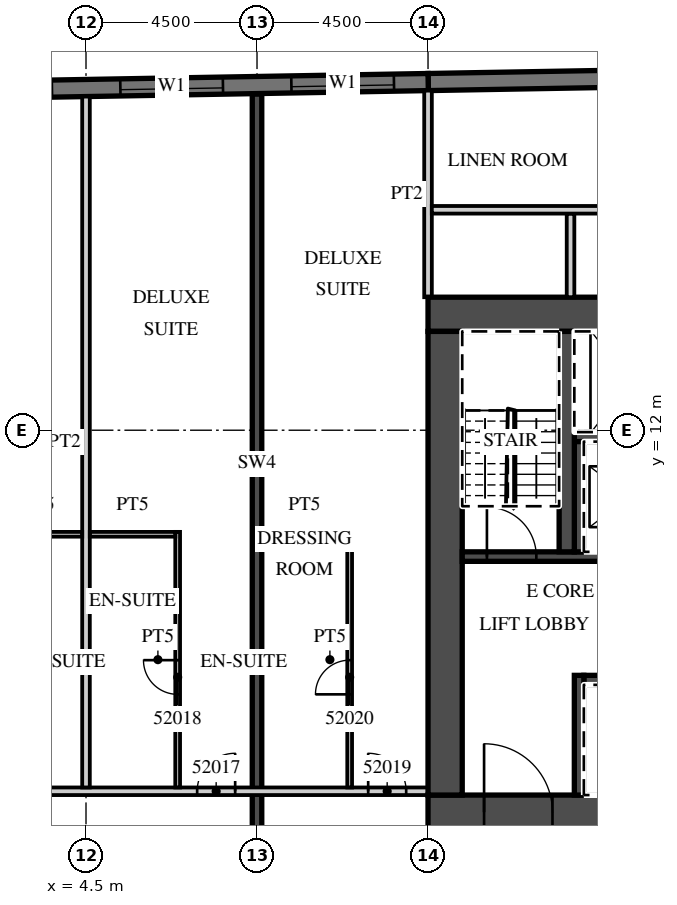
"""IFC4 building model, lengths in metres.
Left out: names, types, materials, properties, quantities, classifications, styles, units other than length and angle.
Written with IfcOpenShell. Run it as: python <this file> out.ifc"""

import sys

from ifc_helpers import new_model, si_unit, direction, frame, frame_2d, origin, place, context, subcontext, project, spatial, rectangle, extrude, element, fill, save


model = new_model("IFC4")
c1 = context("Model", 3, precision=1e-05, world=origin(), true_north=direction((0.0, 1.0)))
c2 = subcontext(c1, "Body", "Model", "MODEL_VIEW")
j1 = project(units=[si_unit("LENGTHUNIT", "METRE"), si_unit("PLANEANGLEUNIT", "RADIAN")], contexts=[c1])
p1 = place(None, origin())
s1 = spatial("IfcSite", under=j1, at=p1, CompositionType="ELEMENT")
p2 = place(p1, origin())
s2 = spatial("IfcBuilding", under=s1, at=p2, CompositionType="ELEMENT")
p3 = place(p2, frame((0.0, 0.0, 217.7)))
s3 = spatial("IfcBuildingStorey", under=s2, at=p3, CompositionType="ELEMENT", Elevation=217.7)
p4 = place(p3, frame((9.0, 1.4, 0.0), z_axis=(0.0, 0.0, 1.0), x_axis=(0.0, 1.0, 0.0)))
e1 = element("IfcWall", 1, at=p4, inside=s3, PredefinedType="SHEAR", context=c2, shape_type="SweptSolid", body=[
    extrude(rectangle(XDim=19.446, YDim=0.25, at=frame_2d((9.723, 0.0))), origin(), (0.0, 0.0, 1.0), 3.3),
])
p5 = place(p3, frame((31.504, 21.476, 0.0), z_axis=(0.0, 0.0, 1.0), x_axis=(-0.999847677887, -0.017453395744, 0.0)))
e2 = element("IfcWall", 2, at=p5, inside=s3, PredefinedType="SOLIDWALL", context=c2, shape_type="SweptSolid", body=[
    extrude(rectangle(XDim=18.003, YDim=0.45, at=frame_2d((9.001, 0.0))), origin(), (0.0, 0.0, 1.0), 3.02),
])
p6 = place(p3, frame((13.504, 21.161, 0.0), z_axis=(0.0, 0.0, 1.0), x_axis=(-0.999847763257, -0.017448504532, 0.0)))
e3 = element("IfcWall", 3, at=p6, inside=s3, PredefinedType="SOLIDWALL", context=c2, shape_type="SweptSolid", body=[
    extrude(rectangle(XDim=46.859, YDim=0.45, at=frame_2d((23.43, 0.0))), origin(), (0.0, 0.0, 1.0), 3.02),
])
p7 = place(p6, frame((0.9, 0.0, 0.45)))
e4 = element("IfcOpeningElement", 4, at=p7, cuts=e3, PredefinedType="OPENING", context=c2, shape_type="SweptSolid", body=[
    extrude(rectangle(XDim=2.7, YDim=2.25, at=frame_2d((1.35, 1.125))), frame((0.0, 0.235, 0.0), z_axis=(0.0, -1.0, 0.0), x_axis=(1.0, 0.0, 0.0)), (0.0, 0.0, 1.0), 0.47),
])
p8 = place(p6, frame((5.401, 0.0, 0.45)))
e5 = element("IfcOpeningElement", 5, at=p8, cuts=e3, PredefinedType="OPENING", context=c2, shape_type="SweptSolid", body=[
    extrude(rectangle(XDim=2.7, YDim=2.25, at=frame_2d((1.35, 1.125))), frame((0.0, 0.235, 0.0), z_axis=(0.0, -1.0, 0.0), x_axis=(1.0, 0.0, 0.0)), (0.0, 0.0, 1.0), 0.47),
])
p9 = place(p6, frame((9.902, 0.0, 0.45)))
e6 = element("IfcOpeningElement", 6, at=p9, cuts=e3, PredefinedType="OPENING", context=c2, shape_type="SweptSolid", body=[
    extrude(rectangle(XDim=2.7, YDim=2.25, at=frame_2d((1.35, 1.125))), frame((0.0, 0.235, 0.0), z_axis=(0.0, -1.0, 0.0), x_axis=(1.0, 0.0, 0.0)), (0.0, 0.0, 1.0), 0.47),
])
p10 = place(p6, frame((14.402, 0.0, 0.45)))
e7 = element("IfcOpeningElement", 7, at=p10, cuts=e3, PredefinedType="OPENING", context=c2, shape_type="SweptSolid", body=[
    extrude(rectangle(XDim=2.7, YDim=2.25, at=frame_2d((1.35, 1.125))), frame((0.0, 0.235, 0.0), z_axis=(0.0, -1.0, 0.0), x_axis=(1.0, 0.0, 0.0)), (0.0, 0.0, 1.0), 0.47),
])
p11 = place(p6, frame((18.903, 0.0, 0.45)))
e8 = element("IfcOpeningElement", 8, at=p11, cuts=e3, PredefinedType="OPENING", context=c2, shape_type="SweptSolid", body=[
    extrude(rectangle(XDim=2.7, YDim=2.25, at=frame_2d((1.35, 1.125))), frame((0.0, 0.235, 0.0), z_axis=(0.0, -1.0, 0.0), x_axis=(1.0, 0.0, 0.0)), (0.0, 0.0, 1.0), 0.47),
])
p12 = place(p6, frame((23.404, 0.0, 0.45)))
e9 = element("IfcOpeningElement", 9, at=p12, cuts=e3, PredefinedType="OPENING", context=c2, shape_type="SweptSolid", body=[
    extrude(rectangle(XDim=2.7, YDim=2.25, at=frame_2d((1.35, 1.125))), frame((0.0, 0.235, 0.0), z_axis=(0.0, -1.0, 0.0), x_axis=(1.0, 0.0, 0.0)), (0.0, 0.0, 1.0), 0.47),
])
p13 = place(p6, frame((27.904, 0.0, 0.45)))
e10 = element("IfcOpeningElement", 10, at=p13, cuts=e3, PredefinedType="OPENING", context=c2, shape_type="SweptSolid", body=[
    extrude(rectangle(XDim=2.7, YDim=2.25, at=frame_2d((1.35, 1.125))), frame((0.0, 0.235, 0.0), z_axis=(0.0, -1.0, 0.0), x_axis=(1.0, 0.0, 0.0)), (0.0, 0.0, 1.0), 0.47),
])
p14 = place(p6, frame((32.405, 0.0, 0.45)))
e11 = element("IfcOpeningElement", 11, at=p14, cuts=e3, PredefinedType="OPENING", context=c2, shape_type="SweptSolid", body=[
    extrude(rectangle(XDim=2.7, YDim=2.25, at=frame_2d((1.35, 1.125))), frame((0.0, 0.235, 0.0), z_axis=(0.0, -1.0, 0.0), x_axis=(1.0, 0.0, 0.0)), (0.0, 0.0, 1.0), 0.47),
])
p15 = place(p6, frame((36.906, 0.0, 0.45)))
e12 = element("IfcOpeningElement", 12, at=p15, cuts=e3, PredefinedType="OPENING", context=c2, shape_type="SweptSolid", body=[
    extrude(rectangle(XDim=2.7, YDim=2.25, at=frame_2d((1.35, 1.125))), frame((0.0, 0.235, 0.0), z_axis=(0.0, -1.0, 0.0), x_axis=(1.0, 0.0, 0.0)), (0.0, 0.0, 1.0), 0.47),
])
p16 = place(p6, frame((41.406, 0.0, 0.45)))
e13 = element("IfcOpeningElement", 13, at=p16, cuts=e3, PredefinedType="OPENING", context=c2, shape_type="SweptSolid", body=[
    extrude(rectangle(XDim=2.7, YDim=2.25, at=frame_2d((1.35, 1.125))), frame((0.0, 0.235, 0.0), z_axis=(0.0, -1.0, 0.0), x_axis=(1.0, 0.0, 0.0)), (0.0, 0.0, 1.0), 0.47),
])
p17 = place(p3, frame((13.5, 15.5, 0.0), z_axis=(0.0, 0.0, 1.0), x_axis=(0.0, 1.0, 0.0)))
e14 = element("IfcWall", 14, at=p17, inside=s3, PredefinedType="PARTITIONING", context=c2, shape_type="SweptSolid", body=[
    extrude(rectangle(XDim=5.436, YDim=0.2, at=frame_2d((2.718, 0.0))), origin(), (0.0, 0.0, 1.0), 3.02),
])
p18 = place(p3, frame((-13.5, 2.5, 0.0), z_axis=(0.0, 0.0, 1.0), x_axis=(1.0, 0.0, 0.0)))
e15 = element("IfcWall", 15, at=p18, inside=s3, PredefinedType="PARTITIONING", context=c2, shape_type="SweptSolid", body=[
    extrude(rectangle(XDim=27.0, YDim=0.2, at=frame_2d((13.5, 0.0))), origin(), (0.0, 0.0, 1.0), 3.02),
])
p19 = place(p18, frame((2.925, 0.0, 0.0)))
e16 = element("IfcOpeningElement", 16, at=p19, cuts=e15, PredefinedType="OPENING", context=c2, shape_type="SweptSolid", body=[
    extrude(rectangle(XDim=1.0, YDim=2.1, at=frame_2d((0.5, 1.05))), frame((0.0, 0.11, 0.0), z_axis=(0.0, -1.0, 0.0), x_axis=(1.0, 0.0, 0.0)), (0.0, 0.0, 1.0), 0.22),
])
p20 = place(p18, frame((7.45, 0.0, 0.0)))
e17 = element("IfcOpeningElement", 17, at=p20, cuts=e15, PredefinedType="OPENING", context=c2, shape_type="SweptSolid", body=[
    extrude(rectangle(XDim=1.0, YDim=2.1, at=frame_2d((0.5, 1.05))), frame((0.0, 0.11, 0.0), z_axis=(0.0, -1.0, 0.0), x_axis=(1.0, 0.0, 0.0)), (0.0, 0.0, 1.0), 0.22),
])
p21 = place(p18, frame((11.925, 0.0, 0.0)))
e18 = element("IfcOpeningElement", 18, at=p21, cuts=e15, PredefinedType="OPENING", context=c2, shape_type="SweptSolid", body=[
    extrude(rectangle(XDim=1.0, YDim=2.1, at=frame_2d((0.5, 1.05))), frame((0.0, 0.11, 0.0), z_axis=(0.0, -1.0, 0.0), x_axis=(1.0, 0.0, 0.0)), (0.0, 0.0, 1.0), 0.22),
])
p22 = place(p18, frame((14.075, 0.0, 0.0)))
e19 = element("IfcOpeningElement", 19, at=p22, cuts=e15, PredefinedType="OPENING", context=c2, shape_type="SweptSolid", body=[
    extrude(rectangle(XDim=1.0, YDim=2.1, at=frame_2d((0.5, 1.05))), frame((0.0, 0.11, 0.0), z_axis=(0.0, -1.0, 0.0), x_axis=(1.0, 0.0, 0.0)), (0.0, 0.0, 1.0), 0.22),
])
p23 = place(p18, frame((20.925, 0.0, 0.0)))
e20 = element("IfcOpeningElement", 20, at=p23, cuts=e15, PredefinedType="OPENING", context=c2, shape_type="SweptSolid", body=[
    extrude(rectangle(XDim=1.0, YDim=2.1, at=frame_2d((0.5, 1.05))), frame((0.0, 0.11, 0.0), z_axis=(0.0, -1.0, 0.0), x_axis=(1.0, 0.0, 0.0)), (0.0, 0.0, 1.0), 0.22),
])
p24 = place(p18, frame((25.425, 0.0, 0.0)))
e21 = element("IfcOpeningElement", 21, at=p24, cuts=e15, PredefinedType="OPENING", context=c2, shape_type="SweptSolid", body=[
    extrude(rectangle(XDim=1.0, YDim=2.1, at=frame_2d((0.5, 1.05))), frame((0.0, 0.11, 0.0), z_axis=(0.0, -1.0, 0.0), x_axis=(1.0, 0.0, 0.0)), (0.0, 0.0, 1.0), 0.22),
])
p25 = place(p3, frame((4.5, 2.6, 0.0), z_axis=(0.0, 0.0, 1.0), x_axis=(0.0, 1.0, 0.0)))
e22 = element("IfcWall", 22, at=p25, inside=s3, PredefinedType="PARTITIONING", context=c2, shape_type="SweptSolid", body=[
    extrude(rectangle(XDim=18.179, YDim=0.2, at=frame_2d((9.089, 0.0))), origin(), (0.0, 0.0, 1.0), 3.02),
])
p26 = place(p3, frame((2.15, 9.262, 0.0), z_axis=(0.0, 0.0, 1.0), x_axis=(1.0, 0.0, 0.0)))
e23 = element("IfcWall", 23, at=p26, inside=s3, PredefinedType="PARTITIONING", context=c2, shape_type="SweptSolid", body=[
    extrude(rectangle(XDim=2.25, YDim=0.125, at=frame_2d((1.125, 0.0))), origin(), (0.0, 0.0, 1.0), 3.02),
])
p27 = place(p3, frame((6.912, 2.6, 0.0), z_axis=(0.0, 0.0, 1.0), x_axis=(0.0, 1.0, 0.0)))
e24 = element("IfcWall", 24, at=p27, inside=s3, PredefinedType="PARTITIONING", context=c2, shape_type="SweptSolid", body=[
    extrude(rectangle(XDim=6.725, YDim=0.125, at=frame_2d((3.362, 0.0))), origin(), (0.0, 0.0, 1.0), 3.02),
])
p28 = place(p27, frame((2.45, 0.0, 0.0)))
e25 = element("IfcOpeningElement", 25, at=p28, cuts=e24, PredefinedType="OPENING", context=c2, shape_type="SweptSolid", body=[
    extrude(rectangle(XDim=0.9, YDim=2.1, at=frame_2d((0.45, 1.05))), frame((0.0, 0.073, 0.0), z_axis=(0.0, -1.0, 0.0), x_axis=(1.0, 0.0, 0.0)), (0.0, 0.0, 1.0), 0.145),
])
p29 = place(p3, frame((4.6, 9.262, 0.0), z_axis=(0.0, 0.0, 1.0), x_axis=(1.0, 0.0, 0.0)))
e26 = element("IfcWall", 26, at=p29, inside=s3, PredefinedType="PARTITIONING", context=c2, shape_type="SweptSolid", body=[
    extrude(rectangle(XDim=2.25, YDim=0.125, at=frame_2d((1.125, 0.0))), origin(), (0.0, 0.0, 1.0), 3.02),
])
p30 = place(p3, frame((11.438, 2.6, 0.0), z_axis=(0.0, 0.0, 1.0), x_axis=(0.0, 1.0, 0.0)))
e27 = element("IfcWall", 27, at=p30, inside=s3, PredefinedType="PARTITIONING", context=c2, shape_type="SweptSolid", body=[
    extrude(rectangle(XDim=6.725, YDim=0.125, at=frame_2d((3.362, 0.0))), origin(), (0.0, 0.0, 1.0), 3.02),
])
p31 = place(p30, frame((2.45, 0.0, 0.0)))
e28 = element("IfcOpeningElement", 28, at=p31, cuts=e27, PredefinedType="OPENING", context=c2, shape_type="SweptSolid", body=[
    extrude(rectangle(XDim=0.9, YDim=2.1, at=frame_2d((0.45, 1.05))), frame((0.0, 0.073, 0.0), z_axis=(0.0, -1.0, 0.0), x_axis=(1.0, 0.0, 0.0)), (0.0, 0.0, 1.0), 0.145),
])
p32 = place(p3, frame((9.125, 9.262, 0.0), z_axis=(0.0, 0.0, 1.0), x_axis=(1.0, 0.0, 0.0)))
e29 = element("IfcWall", 29, at=p32, inside=s3, PredefinedType="PARTITIONING", context=c2, shape_type="SweptSolid", body=[
    extrude(rectangle(XDim=2.25, YDim=0.125, at=frame_2d((1.125, 0.0))), origin(), (0.0, 0.0, 1.0), 3.02),
])
p33 = place(p3, frame((13.5, 1.95, 0.0), z_axis=(0.0, 0.0, 1.0), x_axis=(1.0, 0.0, 0.0)))
e30 = element("IfcWall", 30, at=p33, inside=s3, PredefinedType="SHEAR", context=c2, shape_type="SweptSolid", body=[
    extrude(rectangle(XDim=18.0, YDim=0.9, at=frame_2d((9.0, 0.0))), origin(), (0.0, 0.0, 1.0), 3.02),
])
p34 = place(p33, frame((1.475, 0.0, 0.0)))
e31 = element("IfcOpeningElement", 31, at=p34, cuts=e30, PredefinedType="OPENING", context=c2, shape_type="SweptSolid", body=[
    extrude(rectangle(XDim=1.8, YDim=2.1, at=frame_2d((0.9, 1.05))), frame((0.0, 0.46, 0.0), z_axis=(0.0, -1.0, 0.0), x_axis=(1.0, 0.0, 0.0)), (0.0, 0.0, 1.0), 0.92),
])
p35 = place(p3, frame((13.5, 15.05, 0.0), z_axis=(0.0, 0.0, 1.0), x_axis=(1.0, 0.0, 0.0)))
e32 = element("IfcWall", 32, at=p35, inside=s3, PredefinedType="SHEAR", context=c2, shape_type="SweptSolid", body=[
    extrude(rectangle(XDim=6.8, YDim=0.9, at=frame_2d((3.4, 0.0))), origin(), (0.0, 0.0, 1.0), 3.02),
])
p36 = place(p35, frame((4.725, 0.0, 0.0)))
e33 = element("IfcOpeningElement", 33, at=p36, cuts=e32, PredefinedType="OPENING", context=c2, shape_type="SweptSolid", body=[
    extrude(rectangle(XDim=1.2, YDim=2.1, at=frame_2d((0.6, 1.05))), frame((0.0, 0.46, 0.0), z_axis=(0.0, -1.0, 0.0), x_axis=(1.0, 0.0, 0.0)), (0.0, 0.0, 1.0), 0.92),
])
p37 = place(p3, frame((13.95, 2.4, 0.0), z_axis=(0.0, 0.0, 1.0), x_axis=(0.0, 1.0, 0.0)))
e34 = element("IfcWall", 34, at=p37, inside=s3, PredefinedType="SHEAR", context=c2, shape_type="SweptSolid", body=[
    extrude(rectangle(XDim=12.2, YDim=0.9, at=frame_2d((6.1, 0.0))), origin(), (0.0, 0.0, 1.0), 3.02),
])
p38 = place(p3, frame((17.6, 5.425, 0.0), z_axis=(0.0, 0.0, 1.0), x_axis=(1.0, 0.0, 0.0)))
e35 = element("IfcWall", 35, at=p38, inside=s3, PredefinedType="SHEAR", context=c2, shape_type="SweptSolid", body=[
    extrude(rectangle(XDim=13.0, YDim=0.25, at=frame_2d((6.5, 0.0))), origin(), (0.0, 0.0, 1.0), 3.02),
])
p39 = place(p38, frame((8.475, 0.0, 0.0)))
e36 = element("IfcOpeningElement", 36, at=p39, cuts=e35, PredefinedType="OPENING", context=c2, shape_type="SweptSolid", body=[
    extrude(rectangle(XDim=1.2, YDim=2.1, at=frame_2d((0.6, 1.05))), frame((0.0, 0.135, 0.0), z_axis=(0.0, -1.0, 0.0), x_axis=(1.0, 0.0, 0.0)), (0.0, 0.0, 1.0), 0.27),
])
p40 = place(p38, frame((5.875, 0.0, 0.0)))
e37 = element("IfcOpeningElement", 37, at=p40, cuts=e35, PredefinedType="OPENING", context=c2, shape_type="SweptSolid", body=[
    extrude(rectangle(XDim=1.2, YDim=2.1, at=frame_2d((0.6, 1.05))), frame((0.0, 0.135, 0.0), z_axis=(0.0, -1.0, 0.0), x_axis=(1.0, 0.0, 0.0)), (0.0, 0.0, 1.0), 0.27),
])
p41 = place(p3, frame((17.475, 2.4, 0.0), z_axis=(0.0, 0.0, 1.0), x_axis=(0.0, 1.0, 0.0)))
e38 = element("IfcWall", 38, at=p41, inside=s3, PredefinedType="SHEAR", context=c2, shape_type="SweptSolid", body=[
    extrude(rectangle(XDim=3.15, YDim=0.25, at=frame_2d((1.575, 0.0))), origin(), (0.0, 0.0, 1.0), 3.02),
])
p42 = place(p3, frame((14.4, 8.675, 0.0), z_axis=(0.0, 0.0, 1.0), x_axis=(1.0, 0.0, 0.0)))
e39 = element("IfcWall", 39, at=p42, inside=s3, PredefinedType="SHEAR", context=c2, shape_type="SweptSolid", body=[
    extrude(rectangle(XDim=16.2, YDim=0.25, at=frame_2d((8.1, 0.0))), origin(), (0.0, 0.0, 1.0), 3.02),
])
p43 = place(p42, frame((6.45, 0.0, 0.0)))
e40 = element("IfcOpeningElement", 40, at=p43, cuts=e39, PredefinedType="OPENING", context=c2, shape_type="SweptSolid", body=[
    extrude(rectangle(XDim=1.2, YDim=2.1, at=frame_2d((0.6, 1.05))), frame((0.0, 0.135, 0.0), z_axis=(0.0, -1.0, 0.0), x_axis=(1.0, 0.0, 0.0)), (0.0, 0.0, 1.0), 0.27),
])
p44 = place(p42, frame((3.8, 0.0, 0.0)))
e41 = element("IfcOpeningElement", 41, at=p44, cuts=e39, PredefinedType="OPENING", context=c2, shape_type="SweptSolid", body=[
    extrude(rectangle(XDim=1.2, YDim=2.1, at=frame_2d((0.6, 1.05))), frame((0.0, 0.135, 0.0), z_axis=(0.0, -1.0, 0.0), x_axis=(1.0, 0.0, 0.0)), (0.0, 0.0, 1.0), 0.27),
])
p45 = place(p42, frame((0.65, 0.0, 0.0)))
e42 = element("IfcOpeningElement", 42, at=p45, cuts=e39, PredefinedType="OPENING", context=c2, shape_type="SweptSolid", body=[
    extrude(rectangle(XDim=1.3, YDim=2.1, at=frame_2d((0.65, 1.05))), frame((0.0, 0.135, 0.0), z_axis=(0.0, -1.0, 0.0), x_axis=(1.0, 0.0, 0.0)), (0.0, 0.0, 1.0), 0.27),
])
p46 = place(p42, frame((13.913, 0.0, 0.0)))
e43 = element("IfcOpeningElement", 43, at=p46, cuts=e39, PredefinedType="OPENING", context=c2, shape_type="SweptSolid", body=[
    extrude(rectangle(XDim=1.0, YDim=2.1, at=frame_2d((0.5, 1.05))), frame((0.0, 0.135, 0.0), z_axis=(0.0, -1.0, 0.0), x_axis=(1.0, 0.0, 0.0)), (0.0, 0.0, 1.0), 0.27),
])
p47 = place(p42, frame((9.938, 0.0, 0.0)))
e44 = element("IfcOpeningElement", 44, at=p47, cuts=e39, PredefinedType="OPENING", context=c2, shape_type="SweptSolid", body=[
    extrude(rectangle(XDim=1.0, YDim=2.1, at=frame_2d((0.5, 1.05))), frame((0.0, 0.135, 0.0), z_axis=(0.0, -1.0, 0.0), x_axis=(1.0, 0.0, 0.0)), (0.0, 0.0, 1.0), 0.27),
])
p48 = place(p3, frame((17.35, 11.825, 0.0), z_axis=(0.0, 0.0, 1.0), x_axis=(1.0, 0.0, 0.0)))
e45 = element("IfcWall", 45, at=p48, inside=s3, PredefinedType="SHEAR", context=c2, shape_type="SweptSolid", body=[
    extrude(rectangle(XDim=13.25, YDim=0.25, at=frame_2d((6.625, 0.0))), origin(), (0.0, 0.0, 1.0), 3.02),
])
p49 = place(p3, frame((17.475, 8.8, 0.0), z_axis=(0.0, 0.0, 1.0), x_axis=(0.0, 1.0, 0.0)))
e46 = element("IfcWall", 46, at=p49, inside=s3, PredefinedType="SHEAR", context=c2, shape_type="SweptSolid", body=[
    extrude(rectangle(XDim=2.9, YDim=0.25, at=frame_2d((1.45, 0.0))), origin(), (0.0, 0.0, 1.0), 3.02),
])
p50 = place(p3, frame((17.15, 8.8, 0.0), z_axis=(0.0, 0.0, 1.0), x_axis=(0.0, 1.0, 0.0)))
e47 = element("IfcWall", 47, at=p50, inside=s3, PredefinedType="SHEAR", context=c2, shape_type="SweptSolid", body=[
    extrude(rectangle(XDim=5.8, YDim=0.4, at=frame_2d((2.9, 0.0))), origin(), (0.0, 0.0, 1.0), 3.02),
])
p51 = place(p3, frame((17.25, 15.5, 0.0), z_axis=(0.0, 0.0, 1.0), x_axis=(0.0, 1.0, 0.0)))
e48 = element("IfcWall", 48, at=p51, inside=s3, PredefinedType="PARTITIONING", context=c2, shape_type="SweptSolid", body=[
    extrude(rectangle(XDim=2.2, YDim=0.2, at=frame_2d((1.1, 0.0))), origin(), (0.0, 0.0, 1.0), 3.02),
])
p52 = place(p3, frame((13.6, 17.8, 0.0), z_axis=(0.0, 0.0, 1.0), x_axis=(1.0, 0.0, 0.0)))
e49 = element("IfcWall", 49, at=p52, inside=s3, PredefinedType="PARTITIONING", context=c2, shape_type="SweptSolid", body=[
    extrude(rectangle(XDim=28.657, YDim=0.2, at=frame_2d((14.329, 0.0))), origin(), (0.0, 0.0, 1.0), 3.02),
])
p53 = place(p52, frame((16.613, 0.0, 0.0)))
e50 = element("IfcOpeningElement", 50, at=p53, cuts=e49, PredefinedType="OPENING", context=c2, shape_type="SweptSolid", body=[
    extrude(rectangle(XDim=0.9, YDim=2.1, at=frame_2d((0.45, 1.05))), frame((0.0, 0.11, 0.0), z_axis=(0.0, -1.0, 0.0), x_axis=(1.0, 0.0, 0.0)), (0.0, 0.0, 1.0), 0.22),
])
p54 = place(p52, frame((8.312, 0.0, 0.0)))
e51 = element("IfcOpeningElement", 51, at=p54, cuts=e49, PredefinedType="OPENING", context=c2, shape_type="SweptSolid", body=[
    extrude(rectangle(XDim=0.9, YDim=2.1, at=frame_2d((0.45, 1.05))), frame((0.0, 0.11, 0.0), z_axis=(0.0, -1.0, 0.0), x_axis=(1.0, 0.0, 0.0)), (0.0, 0.0, 1.0), 0.22),
])
p55 = place(p7, origin())
e52 = element("IfcWindow", 52, at=p55, inside=s3, PartitioningType="SINGLE_PANEL", PredefinedType="WINDOW", context=c2, shape_type="SweptSolid", body=[
    extrude(rectangle(XDim=2.7, YDim=2.25, at=frame_2d((1.35, 1.125))), frame((0.0, 0.09, 0.0), z_axis=(0.0, -1.0, 0.0), x_axis=(1.0, 0.0, 0.0)), (0.0, 0.0, 1.0), 0.06),
])
fill(e4, e52)
p56 = place(p8, origin())
e53 = element("IfcWindow", 53, at=p56, inside=s3, PartitioningType="SINGLE_PANEL", PredefinedType="WINDOW", context=c2, shape_type="SweptSolid", body=[
    extrude(rectangle(XDim=2.7, YDim=2.25, at=frame_2d((1.35, 1.125))), frame((0.0, 0.09, 0.0), z_axis=(0.0, -1.0, 0.0), x_axis=(1.0, 0.0, 0.0)), (0.0, 0.0, 1.0), 0.06),
])
fill(e5, e53)
p57 = place(p9, origin())
e54 = element("IfcWindow", 54, at=p57, inside=s3, PartitioningType="SINGLE_PANEL", PredefinedType="WINDOW", context=c2, shape_type="SweptSolid", body=[
    extrude(rectangle(XDim=2.7, YDim=2.25, at=frame_2d((1.35, 1.125))), frame((0.0, 0.09, 0.0), z_axis=(0.0, -1.0, 0.0), x_axis=(1.0, 0.0, 0.0)), (0.0, 0.0, 1.0), 0.06),
])
fill(e6, e54)
p58 = place(p23, origin())
e55 = element("IfcDoor", 55, at=p58, inside=s3, OperationType="SINGLE_SWING_RIGHT", PredefinedType="DOOR", context=c2, shape_type="SweptSolid", body=[
    extrude(rectangle(XDim=1.0, YDim=2.1, at=frame_2d((0.5, 1.05))), frame((0.0, 0.025, 0.0), z_axis=(0.0, -1.0, 0.0), x_axis=(1.0, 0.0, 0.0)), (0.0, 0.0, 1.0), 0.05),
])
fill(e20, e55)
p59 = place(p28, origin())
e56 = element("IfcDoor", 56, at=p59, inside=s3, OperationType="SINGLE_SWING_RIGHT", PredefinedType="DOOR", context=c2, shape_type="SweptSolid", body=[
    extrude(rectangle(XDim=0.9, YDim=2.1, at=frame_2d((0.45, 1.05))), frame((0.0, 0.025, 0.0), z_axis=(0.0, -1.0, 0.0), x_axis=(1.0, 0.0, 0.0)), (0.0, 0.0, 1.0), 0.05),
])
fill(e25, e56)
p60 = place(p24, origin())
e57 = element("IfcDoor", 57, at=p60, inside=s3, OperationType="SINGLE_SWING_LEFT", PredefinedType="DOOR", context=c2, shape_type="SweptSolid", body=[
    extrude(rectangle(XDim=1.0, YDim=2.1, at=frame_2d((0.5, 1.05))), frame((0.0, 0.025, 0.0), z_axis=(0.0, -1.0, 0.0), x_axis=(1.0, 0.0, 0.0)), (0.0, 0.0, 1.0), 0.05),
])
fill(e21, e57)
p61 = place(p31, origin())
e58 = element("IfcDoor", 58, at=p61, inside=s3, OperationType="SINGLE_SWING_LEFT", PredefinedType="DOOR", context=c2, shape_type="SweptSolid", body=[
    extrude(rectangle(XDim=0.9, YDim=2.1, at=frame_2d((0.45, 1.05))), frame((0.0, 0.025, 0.0), z_axis=(0.0, -1.0, 0.0), x_axis=(1.0, 0.0, 0.0)), (0.0, 0.0, 1.0), 0.05),
])
fill(e28, e58)
p62 = place(p34, origin())
e59 = element("IfcDoor", 59, at=p62, inside=s3, OperationType="DOUBLE_DOOR_DOUBLE_SWING", PredefinedType="DOOR", context=c2, shape_type="SweptSolid", body=[
    extrude(rectangle(XDim=1.8, YDim=2.1, at=frame_2d((0.9, 1.05))), frame((0.0, 0.025, 0.0), z_axis=(0.0, -1.0, 0.0), x_axis=(1.0, 0.0, 0.0)), (0.0, 0.0, 1.0), 0.05),
])
fill(e31, e59)
p63 = place(p45, origin())
e60 = element("IfcDoor", 60, at=p63, inside=s3, OperationType="SINGLE_SWING_LEFT", PredefinedType="DOOR", context=c2, shape_type="SweptSolid", body=[
    extrude(rectangle(XDim=1.3, YDim=2.1, at=frame_2d((0.65, 1.05))), frame((0.0, 0.025, 0.0), z_axis=(0.0, -1.0, 0.0), x_axis=(1.0, 0.0, 0.0)), (0.0, 0.0, 1.0), 0.05),
])
fill(e42, e60)
save(model, sys.argv[1])
